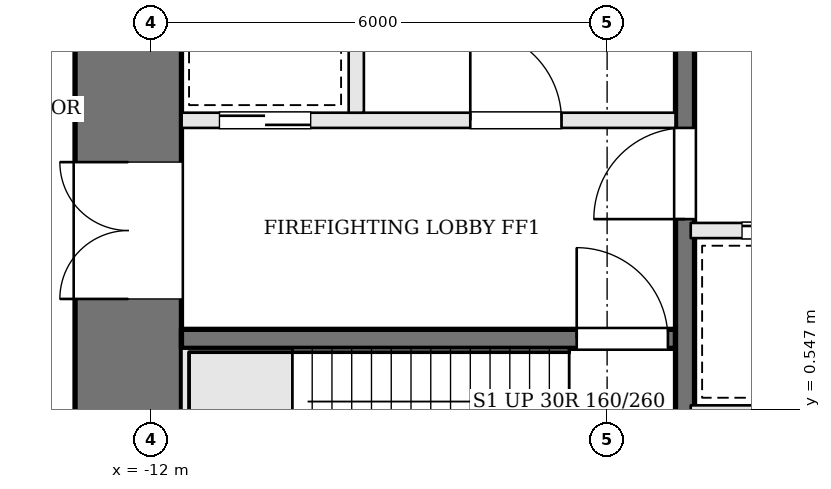
"""IFC4 building model, lengths in metres.
Left out: names, types, materials, properties, quantities, classifications, styles, units other than length and angle.
Written with IfcOpenShell. Run it as: python <this file> out.ifc"""

import sys

from ifc_helpers import new_model, si_unit, direction, frame, frame_2d, origin, place, context, subcontext, project, spatial, rectangle, extrude, element, fill, save


model = new_model("IFC4")
c1 = context("Model", 3, precision=1e-05, world=origin(), true_north=direction((0.0, 1.0)))
c2 = subcontext(c1, "Body", "Model", "MODEL_VIEW")
j1 = project(units=[si_unit("LENGTHUNIT", "METRE"), si_unit("PLANEANGLEUNIT", "RADIAN")], contexts=[c1])
p1 = place(None, origin())
s1 = spatial("IfcSite", under=j1, at=p1, CompositionType="ELEMENT")
p2 = place(p1, origin())
s2 = spatial("IfcBuilding", under=s1, at=p2, CompositionType="ELEMENT")
p3 = place(p2, frame((0.0, 0.0, 28.2)))
s3 = spatial("IfcBuildingStorey", under=s2, at=p3, CompositionType="ELEMENT", Elevation=28.2)
p4 = place(p3, frame((-12.3, -1.6, 0.0), z_axis=(0.0, 0.0, 1.0), x_axis=(0.0, 1.0, 0.0)))
e1 = element("IfcWall", 1, at=p4, inside=s3, PredefinedType="SHEAR", context=c2, shape_type="SweptSolid", body=[
    extrude(rectangle(XDim=12.2, YDim=1.4, at=frame_2d((6.1, 0.0))), origin(), (0.0, 0.0, 1.0), 4.8),
])
p5 = place(p4, frame((3.6, 0.0, 0.0)))
e2 = element("IfcOpeningElement", 2, at=p5, cuts=e1, PredefinedType="OPENING", context=c2, shape_type="SweptSolid", body=[
    extrude(rectangle(XDim=1.8, YDim=2.1, at=frame_2d((0.9, 1.05))), frame((0.0, 0.71, 0.0), z_axis=(0.0, -1.0, 0.0), x_axis=(1.0, 0.0, 0.0)), (0.0, 0.0, 1.0), 1.42),
])
p6 = place(p3, frame((-11.6, 1.475, 0.0), z_axis=(0.0, 0.0, 1.0), x_axis=(1.0, 0.0, 0.0)))
e3 = element("IfcWall", 3, at=p6, inside=s3, PredefinedType="SOLIDWALL", context=c2, shape_type="SweptSolid", body=[
    extrude(rectangle(XDim=6.5, YDim=0.25, at=frame_2d((3.25, 0.0))), origin(), (0.0, 0.0, 1.0), 4.5),
])
p7 = place(p6, frame((5.2, 0.0, 0.0)))
e4 = element("IfcOpeningElement", 4, at=p7, cuts=e3, PredefinedType="OPENING", context=c2, shape_type="SweptSolid", body=[
    extrude(rectangle(XDim=1.2, YDim=2.1, at=frame_2d((0.6, 1.05))), frame((0.0, 0.135, 0.0), z_axis=(0.0, -1.0, 0.0), x_axis=(1.0, 0.0, 0.0)), (0.0, 0.0, 1.0), 0.27),
])
p8 = place(p3, frame((-11.6, 4.35, 0.0), z_axis=(0.0, 0.0, 1.0), x_axis=(1.0, 0.0, 0.0)))
e5 = element("IfcWall", 5, at=p8, inside=s3, PredefinedType="SOLIDWALL", context=c2, shape_type="SweptSolid", body=[
    extrude(rectangle(XDim=6.5, YDim=0.2, at=frame_2d((3.25, 0.0))), origin(), (0.0, 0.0, 1.0), 4.5),
])
p9 = place(p8, frame((3.8, 0.0, 0.0)))
e6 = element("IfcOpeningElement", 6, at=p9, cuts=e5, PredefinedType="OPENING", context=c2, shape_type="SweptSolid", body=[
    extrude(rectangle(XDim=1.2, YDim=2.1, at=frame_2d((0.6, 1.05))), frame((0.0, 0.11, 0.0), z_axis=(0.0, -1.0, 0.0), x_axis=(1.0, 0.0, 0.0)), (0.0, 0.0, 1.0), 0.22),
])
p10 = place(p8, frame((0.5, 0.0, 0.0)))
e7 = element("IfcOpeningElement", 7, at=p10, cuts=e5, PredefinedType="OPENING", context=c2, shape_type="SweptSolid", body=[
    extrude(rectangle(XDim=1.2, YDim=2.1, at=frame_2d((0.6, 1.05))), frame((0.0, 0.11, 0.0), z_axis=(0.0, -1.0, 0.0), x_axis=(1.0, 0.0, 0.0)), (0.0, 0.0, 1.0), 0.22),
])
p11 = place(p3, frame((-9.3, 4.45, 0.0), z_axis=(0.0, 0.0, 1.0), x_axis=(0.0, 1.0, 0.0)))
e8 = element("IfcWall", 8, at=p11, inside=s3, PredefinedType="SOLIDWALL", context=c2, shape_type="SweptSolid", body=[
    extrude(rectangle(XDim=3.0, YDim=0.2, at=frame_2d((1.5, 0.0))), origin(), (0.0, 0.0, 1.0), 4.5),
])
p12 = place(p3, frame((-4.975, -1.6, 0.0), z_axis=(0.0, 0.0, 1.0), x_axis=(0.0, 1.0, 0.0)))
e9 = element("IfcWall", 9, at=p12, inside=s3, PredefinedType="SOLIDWALL", context=c2, shape_type="SweptSolid", body=[
    extrude(rectangle(XDim=12.2, YDim=0.25, at=frame_2d((6.1, 0.0))), origin(), (0.0, 0.0, 1.0), 4.5),
])
p13 = place(p12, frame((4.65, 0.0, 0.0)))
e10 = element("IfcOpeningElement", 10, at=p13, cuts=e9, PredefinedType="OPENING", context=c2, shape_type="SweptSolid", body=[
    extrude(rectangle(XDim=1.2, YDim=2.1, at=frame_2d((0.6, 1.05))), frame((0.0, 0.135, 0.0), z_axis=(0.0, -1.0, 0.0), x_axis=(1.0, 0.0, 0.0)), (0.0, 0.0, 1.0), 0.27),
])
p14 = place(p3, frame((-4.9, 0.5, 0.0), z_axis=(0.0, 0.0, 1.0), x_axis=(1.0, 0.0, 0.0)))
e11 = element("IfcWall", 11, at=p14, inside=s3, PredefinedType="SOLIDWALL", context=c2, shape_type="SweptSolid", body=[
    extrude(rectangle(XDim=9.8, YDim=0.2, at=frame_2d((4.9, 0.0))), origin(), (0.0, 0.0, 1.0), 4.5),
])
p15 = place(p3, frame((-4.9, 2.9, 0.0), z_axis=(0.0, 0.0, 1.0), x_axis=(1.0, 0.0, 0.0)))
e12 = element("IfcWall", 12, at=p15, inside=s3, PredefinedType="SOLIDWALL", context=c2, shape_type="SweptSolid", body=[
    extrude(rectangle(XDim=9.8, YDim=0.2, at=frame_2d((4.9, 0.0))), origin(), (0.0, 0.0, 1.0), 4.5),
])
p16 = place(p15, frame((0.675, 0.0, 0.0)))
e13 = element("IfcOpeningElement", 13, at=p16, cuts=e12, PredefinedType="OPENING", context=c2, shape_type="SweptSolid", body=[
    extrude(rectangle(XDim=1.1, YDim=2.1, at=frame_2d((0.55, 1.05))), frame((0.0, 0.11, 0.0), z_axis=(0.0, -1.0, 0.0), x_axis=(1.0, 0.0, 0.0)), (0.0, 0.0, 1.0), 0.22),
])
p17 = place(p15, frame((3.125, 0.0, 0.0)))
e14 = element("IfcOpeningElement", 14, at=p17, cuts=e12, PredefinedType="OPENING", context=c2, shape_type="SweptSolid", body=[
    extrude(rectangle(XDim=1.1, YDim=2.1, at=frame_2d((0.55, 1.05))), frame((0.0, 0.11, 0.0), z_axis=(0.0, -1.0, 0.0), x_axis=(1.0, 0.0, 0.0)), (0.0, 0.0, 1.0), 0.22),
])
p18 = place(p5, origin())
e15 = element("IfcDoor", 15, at=p18, inside=s3, OperationType="DOUBLE_DOOR_SINGLE_SWING", PredefinedType="DOOR", context=c2, shape_type="SweptSolid", body=[
    extrude(rectangle(XDim=1.8, YDim=2.1, at=frame_2d((0.9, 1.05))), frame((0.0, 0.025, 0.0), z_axis=(0.0, -1.0, 0.0), x_axis=(1.0, 0.0, 0.0)), (0.0, 0.0, 1.0), 0.05),
])
fill(e2, e15)
p19 = place(p13, origin())
e16 = element("IfcDoor", 16, at=p19, inside=s3, OperationType="SINGLE_SWING_LEFT", PredefinedType="DOOR", context=c2, shape_type="SweptSolid", body=[
    extrude(rectangle(XDim=1.2, YDim=2.1, at=frame_2d((0.6, 1.05))), frame((0.0, 0.025, 0.0), z_axis=(0.0, -1.0, 0.0), x_axis=(1.0, 0.0, 0.0)), (0.0, 0.0, 1.0), 0.05),
])
fill(e10, e16)
p20 = place(p9, origin())
e17 = element("IfcDoor", 17, at=p20, inside=s3, OperationType="SINGLE_SWING_LEFT", PredefinedType="DOOR", context=c2, shape_type="SweptSolid", body=[
    extrude(rectangle(XDim=1.2, YDim=2.1, at=frame_2d((0.6, 1.05))), frame((0.0, 0.025, 0.0), z_axis=(0.0, -1.0, 0.0), x_axis=(1.0, 0.0, 0.0)), (0.0, 0.0, 1.0), 0.05),
])
fill(e6, e17)
p21 = place(p7, origin())
e18 = element("IfcDoor", 18, at=p21, inside=s3, OperationType="SINGLE_SWING_LEFT", PredefinedType="DOOR", context=c2, shape_type="SweptSolid", body=[
    extrude(rectangle(XDim=1.2, YDim=2.1, at=frame_2d((0.6, 1.05))), frame((0.0, 0.025, 0.0), z_axis=(0.0, -1.0, 0.0), x_axis=(1.0, 0.0, 0.0)), (0.0, 0.0, 1.0), 0.05),
])
fill(e4, e18)
p22 = place(p10, origin())
e19 = element("IfcDoor", 19, at=p22, inside=s3, OperationType="SLIDING_TO_RIGHT", PredefinedType="DOOR", context=c2, shape_type="SweptSolid", body=[
    extrude(rectangle(XDim=1.2, YDim=2.1, at=frame_2d((0.6, 1.05))), frame((0.0, 0.025, 0.0), z_axis=(0.0, -1.0, 0.0), x_axis=(1.0, 0.0, 0.0)), (0.0, 0.0, 1.0), 0.05),
])
fill(e7, e19)
p23 = place(p16, origin())
e20 = element("IfcDoor", 20, at=p23, inside=s3, OperationType="SLIDING_TO_RIGHT", PredefinedType="DOOR", context=c2, shape_type="SweptSolid", body=[
    extrude(rectangle(XDim=1.1, YDim=2.1, at=frame_2d((0.55, 1.05))), frame((0.0, 0.025, 0.0), z_axis=(0.0, -1.0, 0.0), x_axis=(1.0, 0.0, 0.0)), (0.0, 0.0, 1.0), 0.05),
])
fill(e13, e20)
save(model, sys.argv[1])
